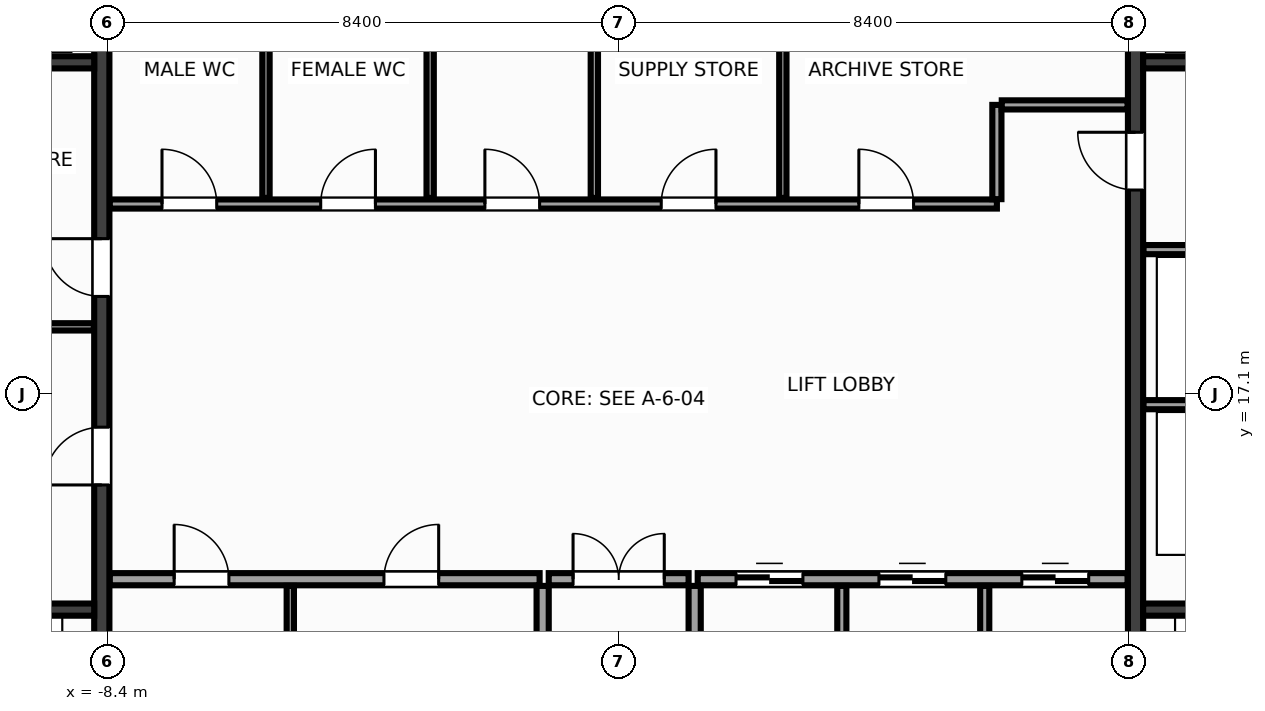
"""IFC4 building model, lengths in metres.
Left out: names, types, materials, properties, quantities, classifications, styles, units other than length and angle.
Written with IfcOpenShell. Run it as: python <this file> out.ifc"""

import sys

from ifc_helpers import new_model, si_unit, direction, frame, frame_2d, origin, place, context, subcontext, project, spatial, rectangle, extrude, source, transform, mapped, element, fill, save


model = new_model("IFC4")
c1 = context("Model", 3, precision=1e-05, world=origin(), true_north=direction((0.0, 1.0)))
c2 = subcontext(c1, "Body", "Model", "MODEL_VIEW")
j1 = project(units=[si_unit("LENGTHUNIT", "METRE"), si_unit("PLANEANGLEUNIT", "RADIAN")], contexts=[c1])
p1 = place(None, origin())
s1 = spatial("IfcSite", under=j1, at=p1, CompositionType="ELEMENT")
p2 = place(p1, origin())
s2 = spatial("IfcBuilding", under=s1, at=p2, CompositionType="ELEMENT")
p3 = place(p2, frame((0.0, 0.0, 99.2)))
s3 = spatial("IfcBuildingStorey", under=s2, at=p3, CompositionType="ELEMENT", Elevation=99.2)
m1 = source(origin(), c2, "Body", "SweptSolid", [
    extrude(rectangle(XDim=12.95, YDim=0.25, at=frame_2d((6.475, 0.0))), origin(), (0.0, 0.0, 1.0), 3.6),
])
p4 = place(p3, frame((-8.5, 10.525, 0.0), z_axis=(0.0, 0.0, 1.0), x_axis=(0.0, 1.0, 0.0)))
e1 = element("IfcWall", 1, at=p4, inside=s3, PredefinedType="SHEAR", context=c2, shape_type="MappedRepresentation", body=[
    mapped(m1, transform((0.0, 0.0, 0.0), x_axis=(1.0, 0.0, 0.0), y_axis=(0.0, 1.0, 0.0), z_axis=(0.0, 0.0, 1.0), scale=1.0)),
])
p5 = place(p4, frame((5.075, 0.0, 0.0)))
e2 = element("IfcOpeningElement", 2, at=p5, cuts=e1, PredefinedType="OPENING", context=c2, shape_type="SweptSolid", body=[
    extrude(rectangle(XDim=0.95, YDim=2.15, at=frame_2d((0.475, 1.075))), frame((0.0, 0.137, 0.0), z_axis=(0.0, -1.0, 0.0), x_axis=(1.0, 0.0, 0.0)), (0.0, 0.0, 1.0), 0.274),
])
p6 = place(p4, frame((8.175, 0.0, 0.0)))
e3 = element("IfcOpeningElement", 3, at=p6, cuts=e1, PredefinedType="OPENING", context=c2, shape_type="SweptSolid", body=[
    extrude(rectangle(XDim=0.95, YDim=2.15, at=frame_2d((0.475, 1.075))), frame((0.0, 0.137, 0.0), z_axis=(0.0, -1.0, 0.0), x_axis=(1.0, 0.0, 0.0)), (0.0, 0.0, 1.0), 0.274),
])
p7 = place(p3, frame((8.5, 10.525, 0.0), z_axis=(0.0, 0.0, 1.0), x_axis=(0.0, 1.0, 0.0)))
e4 = element("IfcWall", 4, at=p7, inside=s3, PredefinedType="SHEAR", context=c2, shape_type="MappedRepresentation", body=[
    mapped(m1, transform((0.0, 0.0, 0.0), x_axis=(1.0, 0.0, 0.0), y_axis=(0.0, 1.0, 0.0), z_axis=(0.0, 0.0, 1.0), scale=1.0)),
])
p8 = place(p7, frame((9.925, 0.0, 0.0)))
e5 = element("IfcOpeningElement", 5, at=p8, cuts=e4, PredefinedType="OPENING", context=c2, shape_type="SweptSolid", body=[
    extrude(rectangle(XDim=0.95, YDim=2.15, at=frame_2d((0.475, 1.075))), frame((0.0, 0.137, 0.0), z_axis=(0.0, -1.0, 0.0), x_axis=(1.0, 0.0, 0.0)), (0.0, 0.0, 1.0), 0.274),
])
m2 = source(origin(), c2, "Body", "SweptSolid", [
    extrude(rectangle(XDim=2.825, YDim=0.2, at=frame_2d((1.413, 0.0))), origin(), (0.0, 0.0, 1.0), 3.6),
])
for number, where, z_axis, x_axis in (
    (6, (-11.45, 13.55, 0.0), (0.0, 0.0, 1.0), (1.0, 0.0, 0.0)),
    (7, (8.625, 13.55, 0.0), (0.0, 0.0, 1.0), (1.0, 0.0, 0.0)),
):
    element("IfcWall", number, at=place(p3, frame(where, z_axis=z_axis, x_axis=x_axis)), inside=s3, PredefinedType="SHEAR", context=c2, shape_type="MappedRepresentation", body=[
        mapped(m2, transform((0.0, 0.0, 0.0), x_axis=(1.0, 0.0, 0.0), y_axis=(0.0, 1.0, 0.0), z_axis=(0.0, 0.0, 1.0), scale=1.0)),
    ])
m3 = source(origin(), c2, "Body", "SweptSolid", [
    extrude(rectangle(XDim=3.02, YDim=0.2, at=frame_2d((1.51, 0.0))), origin(), (0.0, 0.0, 1.0), 3.6),
])
for number, where, z_axis, x_axis in (
    (8, (-11.645, 22.55, 0.0), (0.0, 0.0, 1.0), (1.0, 0.0, 0.0)),
    (9, (8.625, 22.55, 0.0), (0.0, 0.0, 1.0), (1.0, 0.0, 0.0)),
):
    element("IfcWall", number, at=place(p3, frame(where, z_axis=z_axis, x_axis=x_axis)), inside=s3, PredefinedType="SHEAR", context=c2, shape_type="MappedRepresentation", body=[
        mapped(m3, transform((0.0, 0.0, 0.0), x_axis=(1.0, 0.0, 0.0), y_axis=(0.0, 1.0, 0.0), z_axis=(0.0, 0.0, 1.0), scale=1.0)),
    ])
m4 = source(origin(), c2, "Body", "SweptSolid", [
    extrude(rectangle(XDim=3.01, YDim=0.12, at=frame_2d((1.505, 0.0))), origin(), (0.0, 0.0, 1.0), 3.36),
])
p9 = place(p3, frame((-11.64, 18.2, 0.0), z_axis=(0.0, 0.0, 1.0), x_axis=(1.0, 0.0, 0.0)))
e10 = element("IfcWall", 10, at=p9, inside=s3, PredefinedType="PARTITIONING", context=c2, shape_type="MappedRepresentation", body=[
    mapped(m4, transform((0.0, 0.0, 0.0), x_axis=(1.0, 0.0, 0.0), y_axis=(0.0, 1.0, 0.0), z_axis=(0.0, 0.0, 1.0), scale=1.0)),
])
m5 = source(origin(), c2, "Body", "SweptSolid", [
    extrude(rectangle(XDim=3.01, YDim=0.15, at=frame_2d((1.505, 0.0))), origin(), (0.0, 0.0, 1.0), 3.36),
])
for number, where, z_axis, x_axis in (
    (11, (8.63, 16.92, 0.0), (0.0, 0.0, 1.0), (1.0, 0.0, 0.0)),
    (12, (8.63, 19.47, 0.0), (0.0, 0.0, 1.0), (1.0, 0.0, 0.0)),
):
    element("IfcWall", number, at=place(p3, frame(where, z_axis=z_axis, x_axis=x_axis)), inside=s3, PredefinedType="PARTITIONING", context=c2, shape_type="MappedRepresentation", body=[
        mapped(m5, transform((0.0, 0.0, 0.0), x_axis=(1.0, 0.0, 0.0), y_axis=(0.0, 1.0, 0.0), z_axis=(0.0, 0.0, 1.0), scale=1.0)),
    ])
m6 = source(origin(), c2, "Body", "SweptSolid", [
    extrude(rectangle(XDim=7.07, YDim=0.2, at=frame_2d((3.535, 0.0))), origin(), (0.0, 0.0, 1.0), 3.36),
])
p10 = place(p3, frame((-8.37, 14.05, 0.0), z_axis=(0.0, 0.0, 1.0), x_axis=(1.0, 0.0, 0.0)))
e13 = element("IfcWall", 13, at=p10, inside=s3, PredefinedType="PARTITIONING", context=c2, shape_type="MappedRepresentation", body=[
    mapped(m6, transform((0.0, 0.0, 0.0), x_axis=(1.0, 0.0, 0.0), y_axis=(0.0, 1.0, 0.0), z_axis=(0.0, 0.0, 1.0), scale=1.0)),
])
p11 = place(p10, frame((1.06, 0.0, 0.0)))
e14 = element("IfcOpeningElement", 14, at=p11, cuts=e13, PredefinedType="OPENING", context=c2, shape_type="SweptSolid", body=[
    extrude(rectangle(XDim=0.9, YDim=2.15, at=frame_2d((0.45, 1.075))), frame((0.0, 0.112, 0.0), z_axis=(0.0, -1.0, 0.0), x_axis=(1.0, 0.0, 0.0)), (0.0, 0.0, 1.0), 0.224),
])
p12 = place(p10, frame((4.51, 0.0, 0.0)))
e15 = element("IfcOpeningElement", 15, at=p12, cuts=e13, PredefinedType="OPENING", context=c2, shape_type="SweptSolid", body=[
    extrude(rectangle(XDim=0.9, YDim=2.15, at=frame_2d((0.45, 1.075))), frame((0.0, 0.112, 0.0), z_axis=(0.0, -1.0, 0.0), x_axis=(1.0, 0.0, 0.0)), (0.0, 0.0, 1.0), 0.224),
])
p13 = place(p3, frame((1.3, 14.05, 0.0), z_axis=(0.0, 0.0, 1.0), x_axis=(1.0, 0.0, 0.0)))
e16 = element("IfcWall", 16, at=p13, inside=s3, PredefinedType="PARTITIONING", context=c2, shape_type="MappedRepresentation", body=[
    mapped(m6, transform((0.0, 0.0, 0.0), x_axis=(1.0, 0.0, 0.0), y_axis=(0.0, 1.0, 0.0), z_axis=(0.0, 0.0, 1.0), scale=1.0)),
])
p14 = place(p13, frame((0.63, 0.0, 0.0)))
e17 = element("IfcOpeningElement", 17, at=p14, cuts=e16, PredefinedType="OPENING", context=c2, shape_type="SweptSolid", body=[
    extrude(rectangle(XDim=1.1, YDim=2.15, at=frame_2d((0.55, 1.075))), frame((0.0, 0.112, 0.0), z_axis=(0.0, -1.0, 0.0), x_axis=(1.0, 0.0, 0.0)), (0.0, 0.0, 1.0), 0.224),
])
p15 = place(p13, frame((2.98, 0.0, 0.0)))
e18 = element("IfcOpeningElement", 18, at=p15, cuts=e16, PredefinedType="OPENING", context=c2, shape_type="SweptSolid", body=[
    extrude(rectangle(XDim=1.1, YDim=2.15, at=frame_2d((0.55, 1.075))), frame((0.0, 0.112, 0.0), z_axis=(0.0, -1.0, 0.0), x_axis=(1.0, 0.0, 0.0)), (0.0, 0.0, 1.0), 0.224),
])
p16 = place(p13, frame((5.33, 0.0, 0.0)))
e19 = element("IfcOpeningElement", 19, at=p16, cuts=e16, PredefinedType="OPENING", context=c2, shape_type="SweptSolid", body=[
    extrude(rectangle(XDim=1.1, YDim=2.15, at=frame_2d((0.55, 1.075))), frame((0.0, 0.112, 0.0), z_axis=(0.0, -1.0, 0.0), x_axis=(1.0, 0.0, 0.0)), (0.0, 0.0, 1.0), 0.224),
])
m7 = source(origin(), c2, "Body", "SweptSolid", [
    extrude(rectangle(XDim=3.415, YDim=0.2, at=frame_2d((1.708, 0.0))), origin(), (0.0, 0.0, 1.0), 3.36),
])
for number, where, z_axis, x_axis in (
    (20, (-1.25, 10.525, 0.0), (0.0, 0.0, 1.0), (0.0, 1.0, 0.0)),
    (21, (1.25, 10.525, 0.0), (0.0, 0.0, 1.0), (0.0, 1.0, 0.0)),
):
    element("IfcWall", number, at=place(p3, frame(where, z_axis=z_axis, x_axis=x_axis)), inside=s3, PredefinedType="PARTITIONING", context=c2, shape_type="MappedRepresentation", body=[
        mapped(m7, transform((0.0, 0.0, 0.0), x_axis=(1.0, 0.0, 0.0), y_axis=(0.0, 1.0, 0.0), z_axis=(0.0, 0.0, 1.0), scale=1.0)),
    ])
m8 = source(origin(), c2, "Body", "SweptSolid", [
    extrude(rectangle(XDim=2.3, YDim=0.2, at=frame_2d((1.15, 0.0))), origin(), (0.0, 0.0, 1.0), 3.36),
])
p17 = place(p3, frame((-1.15, 14.05, 0.0), z_axis=(0.0, 0.0, 1.0), x_axis=(1.0, 0.0, 0.0)))
e22 = element("IfcWall", 22, at=p17, inside=s3, PredefinedType="PARTITIONING", context=c2, shape_type="MappedRepresentation", body=[
    mapped(m8, transform((0.0, 0.0, 0.0), x_axis=(1.0, 0.0, 0.0), y_axis=(0.0, 1.0, 0.0), z_axis=(0.0, 0.0, 1.0), scale=1.0)),
])
p18 = place(p17, frame((0.4, 0.0, 0.0)))
e23 = element("IfcOpeningElement", 23, at=p18, cuts=e22, PredefinedType="OPENING", context=c2, shape_type="SweptSolid", body=[
    extrude(rectangle(XDim=1.5, YDim=2.2, at=frame_2d((0.75, 1.1))), frame((0.0, 0.112, 0.0), z_axis=(0.0, -1.0, 0.0), x_axis=(1.0, 0.0, 0.0)), (0.0, 0.0, 1.0), 0.224),
])
m9 = source(origin(), c2, "Body", "SweptSolid", [
    extrude(rectangle(XDim=14.59, YDim=0.15, at=frame_2d((7.295, 0.0))), origin(), (0.0, 0.0, 1.0), 3.36),
])
p19 = place(p3, frame((-8.37, 20.22, 0.0), z_axis=(0.0, 0.0, 1.0), x_axis=(1.0, 0.0, 0.0)))
e24 = element("IfcWall", 24, at=p19, inside=s3, PredefinedType="PARTITIONING", context=c2, shape_type="MappedRepresentation", body=[
    mapped(m9, transform((0.0, 0.0, 0.0), x_axis=(1.0, 0.0, 0.0), y_axis=(0.0, 1.0, 0.0), z_axis=(0.0, 0.0, 1.0), scale=1.0)),
])
p20 = place(p19, frame((0.86, 0.0, 0.0)))
e25 = element("IfcOpeningElement", 25, at=p20, cuts=e24, PredefinedType="OPENING", context=c2, shape_type="SweptSolid", body=[
    extrude(rectangle(XDim=0.9, YDim=2.15, at=frame_2d((0.45, 1.075))), frame((0.0, 0.087, 0.0), z_axis=(0.0, -1.0, 0.0), x_axis=(1.0, 0.0, 0.0)), (0.0, 0.0, 1.0), 0.174),
])
p21 = place(p19, frame((3.47, 0.0, 0.0)))
e26 = element("IfcOpeningElement", 26, at=p21, cuts=e24, PredefinedType="OPENING", context=c2, shape_type="SweptSolid", body=[
    extrude(rectangle(XDim=0.9, YDim=2.15, at=frame_2d((0.45, 1.075))), frame((0.0, 0.087, 0.0), z_axis=(0.0, -1.0, 0.0), x_axis=(1.0, 0.0, 0.0)), (0.0, 0.0, 1.0), 0.174),
])
p22 = place(p19, frame((6.17, 0.0, 0.0)))
e27 = element("IfcOpeningElement", 27, at=p22, cuts=e24, PredefinedType="OPENING", context=c2, shape_type="SweptSolid", body=[
    extrude(rectangle(XDim=0.9, YDim=2.15, at=frame_2d((0.45, 1.075))), frame((0.0, 0.087, 0.0), z_axis=(0.0, -1.0, 0.0), x_axis=(1.0, 0.0, 0.0)), (0.0, 0.0, 1.0), 0.174),
])
p23 = place(p19, frame((9.07, 0.0, 0.0)))
e28 = element("IfcOpeningElement", 28, at=p23, cuts=e24, PredefinedType="OPENING", context=c2, shape_type="SweptSolid", body=[
    extrude(rectangle(XDim=0.9, YDim=2.15, at=frame_2d((0.45, 1.075))), frame((0.0, 0.087, 0.0), z_axis=(0.0, -1.0, 0.0), x_axis=(1.0, 0.0, 0.0)), (0.0, 0.0, 1.0), 0.174),
])
p24 = place(p19, frame((12.32, 0.0, 0.0)))
e29 = element("IfcOpeningElement", 29, at=p24, cuts=e24, PredefinedType="OPENING", context=c2, shape_type="SweptSolid", body=[
    extrude(rectangle(XDim=0.9, YDim=2.15, at=frame_2d((0.45, 1.075))), frame((0.0, 0.087, 0.0), z_axis=(0.0, -1.0, 0.0), x_axis=(1.0, 0.0, 0.0)), (0.0, 0.0, 1.0), 0.174),
])
m10 = source(origin(), c2, "Body", "SweptSolid", [
    extrude(rectangle(XDim=1.55, YDim=0.15, at=frame_2d((0.775, 0.0))), origin(), (0.0, 0.0, 1.0), 3.36),
])
p25 = place(p3, frame((6.22, 20.3, 0.0), z_axis=(0.0, 0.0, 1.0), x_axis=(0.0, 1.0, 0.0)))
e30 = element("IfcWall", 30, at=p25, inside=s3, PredefinedType="PARTITIONING", context=c2, shape_type="MappedRepresentation", body=[
    mapped(m10, transform((0.0, 0.0, 0.0), x_axis=(1.0, 0.0, 0.0), y_axis=(0.0, 1.0, 0.0), z_axis=(0.0, 0.0, 1.0), scale=1.0)),
])
m11 = source(origin(), c2, "Body", "SweptSolid", [
    extrude(rectangle(XDim=2.07, YDim=0.15, at=frame_2d((1.035, 0.0))), origin(), (0.0, 0.0, 1.0), 3.36),
])
p26 = place(p3, frame((6.3, 21.85, 0.0), z_axis=(0.0, 0.0, 1.0), x_axis=(1.0, 0.0, 0.0)))
e31 = element("IfcWall", 31, at=p26, inside=s3, PredefinedType="PARTITIONING", context=c2, shape_type="MappedRepresentation", body=[
    mapped(m11, transform((0.0, 0.0, 0.0), x_axis=(1.0, 0.0, 0.0), y_axis=(0.0, 1.0, 0.0), z_axis=(0.0, 0.0, 1.0), scale=1.0)),
])
m12 = source(origin(), c2, "Body", "SweptSolid", [
    extrude(rectangle(XDim=3.415, YDim=0.12, at=frame_2d((1.708, 0.0))), origin(), (0.0, 0.0, 1.0), 3.36),
])
p27 = place(p3, frame((-5.4, 10.525, 0.0), z_axis=(0.0, 0.0, 1.0), x_axis=(0.0, 1.0, 0.0)))
e32 = element("IfcWall", 32, at=p27, inside=s3, PredefinedType="PARTITIONING", context=c2, shape_type="MappedRepresentation", body=[
    mapped(m12, transform((0.0, 0.0, 0.0), x_axis=(1.0, 0.0, 0.0), y_axis=(0.0, 1.0, 0.0), z_axis=(0.0, 0.0, 1.0), scale=1.0)),
])
m13 = source(origin(), c2, "Body", "SweptSolid", [
    extrude(rectangle(XDim=3.415, YDim=0.15, at=frame_2d((1.708, 0.0))), origin(), (0.0, 0.0, 1.0), 3.36),
])
for number, where, z_axis, x_axis in (
    (33, (3.67, 10.525, 0.0), (0.0, 0.0, 1.0), (0.0, 1.0, 0.0)),
    (34, (6.02, 10.525, 0.0), (0.0, 0.0, 1.0), (0.0, 1.0, 0.0)),
):
    element("IfcWall", number, at=place(p3, frame(where, z_axis=z_axis, x_axis=x_axis)), inside=s3, PredefinedType="PARTITIONING", context=c2, shape_type="MappedRepresentation", body=[
        mapped(m13, transform((0.0, 0.0, 0.0), x_axis=(1.0, 0.0, 0.0), y_axis=(0.0, 1.0, 0.0), z_axis=(0.0, 0.0, 1.0), scale=1.0)),
    ])
m14 = source(origin(), c2, "Body", "SweptSolid", [
    extrude(rectangle(XDim=3.115, YDim=0.12, at=frame_2d((1.558, 0.0))), origin(), (0.0, 0.0, 1.0), 3.36),
])
for number, where, z_axis, x_axis in (
    (35, (-5.8, 20.32, 0.0), (0.0, 0.0, 1.0), (0.0, 1.0, 0.0)),
    (36, (-3.1, 20.32, 0.0), (0.0, 0.0, 1.0), (0.0, 1.0, 0.0)),
    (37, (-0.4, 20.32, 0.0), (0.0, 0.0, 1.0), (0.0, 1.0, 0.0)),
    (38, (2.7, 20.32, 0.0), (0.0, 0.0, 1.0), (0.0, 1.0, 0.0)),
):
    element("IfcWall", number, at=place(p3, frame(where, z_axis=z_axis, x_axis=x_axis)), inside=s3, PredefinedType="PARTITIONING", context=c2, shape_type="MappedRepresentation", body=[
        mapped(m14, transform((0.0, 0.0, 0.0), x_axis=(1.0, 0.0, 0.0), y_axis=(0.0, 1.0, 0.0), z_axis=(0.0, 0.0, 1.0), scale=1.0)),
    ])
m15 = source(origin(), c2, "Body", "SweptSolid", [
    extrude(rectangle(XDim=0.95, YDim=2.15, at=frame_2d((0.475, 1.075))), frame((0.0, 0.025, 0.0), z_axis=(0.0, -1.0, 0.0), x_axis=(1.0, 0.0, 0.0)), (0.0, 0.0, 1.0), 0.05),
])
p28 = place(p5, origin())
e39 = element("IfcDoor", 39, at=p28, inside=s3, OperationType="SINGLE_SWING_LEFT", PredefinedType="DOOR", context=c2, shape_type="MappedRepresentation", body=[
    mapped(m15, transform((0.0, 0.0, 0.0), x_axis=(1.0, 0.0, 0.0), y_axis=(0.0, 1.0, 0.0), z_axis=(0.0, 0.0, 1.0), scale=1.0)),
])
fill(e2, e39)
p29 = place(p6, origin())
e40 = element("IfcDoor", 40, at=p29, inside=s3, OperationType="SINGLE_SWING_RIGHT", PredefinedType="DOOR", context=c2, shape_type="MappedRepresentation", body=[
    mapped(m15, transform((0.0, 0.0, 0.0), x_axis=(1.0, 0.0, 0.0), y_axis=(0.0, 1.0, 0.0), z_axis=(0.0, 0.0, 1.0), scale=1.0)),
])
fill(e3, e40)
m16 = source(origin(), c2, "Body", "SweptSolid", [
    extrude(rectangle(XDim=0.95, YDim=2.15, at=frame_2d((0.475, 1.075))), frame((0.0, 0.025, 0.0), z_axis=(0.0, -1.0, 0.0), x_axis=(1.0, 0.0, 0.0)), (0.0, 0.0, 1.0), 0.05),
])
p30 = place(p8, origin())
e41 = element("IfcDoor", 41, at=p30, inside=s3, OperationType="SINGLE_SWING_RIGHT", PredefinedType="DOOR", context=c2, shape_type="MappedRepresentation", body=[
    mapped(m16, transform((0.0, 0.0, 0.0), x_axis=(1.0, 0.0, 0.0), y_axis=(0.0, 1.0, 0.0), z_axis=(0.0, 0.0, 1.0), scale=1.0)),
])
fill(e5, e41)
m17 = source(origin(), c2, "Body", "SweptSolid", [
    extrude(rectangle(XDim=0.9, YDim=2.15, at=frame_2d((0.45, 1.075))), frame((0.0, 0.025, 0.0), z_axis=(0.0, -1.0, 0.0), x_axis=(1.0, 0.0, 0.0)), (0.0, 0.0, 1.0), 0.05),
])
p31 = place(p11, origin())
e42 = element("IfcDoor", 42, at=p31, inside=s3, OperationType="SINGLE_SWING_LEFT", PredefinedType="DOOR", context=c2, shape_type="MappedRepresentation", body=[
    mapped(m17, transform((0.0, 0.0, 0.0), x_axis=(1.0, 0.0, 0.0), y_axis=(0.0, 1.0, 0.0), z_axis=(0.0, 0.0, 1.0), scale=1.0)),
])
fill(e14, e42)
p32 = place(p12, origin())
e43 = element("IfcDoor", 43, at=p32, inside=s3, OperationType="SINGLE_SWING_RIGHT", PredefinedType="DOOR", context=c2, shape_type="MappedRepresentation", body=[
    mapped(m17, transform((0.0, 0.0, 0.0), x_axis=(1.0, 0.0, 0.0), y_axis=(0.0, 1.0, 0.0), z_axis=(0.0, 0.0, 1.0), scale=1.0)),
])
fill(e15, e43)
m18 = source(origin(), c2, "Body", "SweptSolid", [
    extrude(rectangle(XDim=1.1, YDim=2.15, at=frame_2d((0.55, 1.075))), frame((0.0, 0.025, 0.0), z_axis=(0.0, -1.0, 0.0), x_axis=(1.0, 0.0, 0.0)), (0.0, 0.0, 1.0), 0.05),
])
p33 = place(p14, origin())
e44 = element("IfcDoor", 44, at=p33, inside=s3, OperationType="DOUBLE_DOOR_SLIDING", PredefinedType="DOOR", context=c2, shape_type="MappedRepresentation", body=[
    mapped(m18, transform((0.0, 0.0, 0.0), x_axis=(1.0, 0.0, 0.0), y_axis=(0.0, 1.0, 0.0), z_axis=(0.0, 0.0, 1.0), scale=1.0)),
])
fill(e17, e44)
p34 = place(p15, origin())
e45 = element("IfcDoor", 45, at=p34, inside=s3, OperationType="DOUBLE_DOOR_SLIDING", PredefinedType="DOOR", context=c2, shape_type="MappedRepresentation", body=[
    mapped(m18, transform((0.0, 0.0, 0.0), x_axis=(1.0, 0.0, 0.0), y_axis=(0.0, 1.0, 0.0), z_axis=(0.0, 0.0, 1.0), scale=1.0)),
])
fill(e18, e45)
p35 = place(p16, origin())
e46 = element("IfcDoor", 46, at=p35, inside=s3, OperationType="DOUBLE_DOOR_SLIDING", PredefinedType="DOOR", context=c2, shape_type="MappedRepresentation", body=[
    mapped(m18, transform((0.0, 0.0, 0.0), x_axis=(1.0, 0.0, 0.0), y_axis=(0.0, 1.0, 0.0), z_axis=(0.0, 0.0, 1.0), scale=1.0)),
])
fill(e19, e46)
m19 = source(origin(), c2, "Body", "SweptSolid", [
    extrude(rectangle(XDim=1.5, YDim=2.2, at=frame_2d((0.75, 1.1))), frame((0.0, 0.025, 0.0), z_axis=(0.0, -1.0, 0.0), x_axis=(1.0, 0.0, 0.0)), (0.0, 0.0, 1.0), 0.05),
])
p36 = place(p18, origin())
e47 = element("IfcDoor", 47, at=p36, inside=s3, OperationType="DOUBLE_DOOR_SINGLE_SWING", PredefinedType="DOOR", context=c2, shape_type="MappedRepresentation", body=[
    mapped(m19, transform((0.0, 0.0, 0.0), x_axis=(1.0, 0.0, 0.0), y_axis=(0.0, 1.0, 0.0), z_axis=(0.0, 0.0, 1.0), scale=1.0)),
])
fill(e23, e47)
p37 = place(p20, origin())
e48 = element("IfcDoor", 48, at=p37, inside=s3, OperationType="SINGLE_SWING_LEFT", PredefinedType="DOOR", context=c2, shape_type="MappedRepresentation", body=[
    mapped(m17, transform((0.0, 0.0, 0.0), x_axis=(1.0, 0.0, 0.0), y_axis=(0.0, 1.0, 0.0), z_axis=(0.0, 0.0, 1.0), scale=1.0)),
])
fill(e25, e48)
p38 = place(p21, origin())
e49 = element("IfcDoor", 49, at=p38, inside=s3, OperationType="SINGLE_SWING_RIGHT", PredefinedType="DOOR", context=c2, shape_type="MappedRepresentation", body=[
    mapped(m17, transform((0.0, 0.0, 0.0), x_axis=(1.0, 0.0, 0.0), y_axis=(0.0, 1.0, 0.0), z_axis=(0.0, 0.0, 1.0), scale=1.0)),
])
fill(e26, e49)
p39 = place(p22, origin())
e50 = element("IfcDoor", 50, at=p39, inside=s3, OperationType="SINGLE_SWING_LEFT", PredefinedType="DOOR", context=c2, shape_type="MappedRepresentation", body=[
    mapped(m17, transform((0.0, 0.0, 0.0), x_axis=(1.0, 0.0, 0.0), y_axis=(0.0, 1.0, 0.0), z_axis=(0.0, 0.0, 1.0), scale=1.0)),
])
fill(e27, e50)
p40 = place(p23, origin())
e51 = element("IfcDoor", 51, at=p40, inside=s3, OperationType="SINGLE_SWING_RIGHT", PredefinedType="DOOR", context=c2, shape_type="MappedRepresentation", body=[
    mapped(m17, transform((0.0, 0.0, 0.0), x_axis=(1.0, 0.0, 0.0), y_axis=(0.0, 1.0, 0.0), z_axis=(0.0, 0.0, 1.0), scale=1.0)),
])
fill(e28, e51)
p41 = place(p24, origin())
e52 = element("IfcDoor", 52, at=p41, inside=s3, OperationType="SINGLE_SWING_LEFT", PredefinedType="DOOR", context=c2, shape_type="MappedRepresentation", body=[
    mapped(m17, transform((0.0, 0.0, 0.0), x_axis=(1.0, 0.0, 0.0), y_axis=(0.0, 1.0, 0.0), z_axis=(0.0, 0.0, 1.0), scale=1.0)),
])
fill(e29, e52)
save(model, sys.argv[1])
